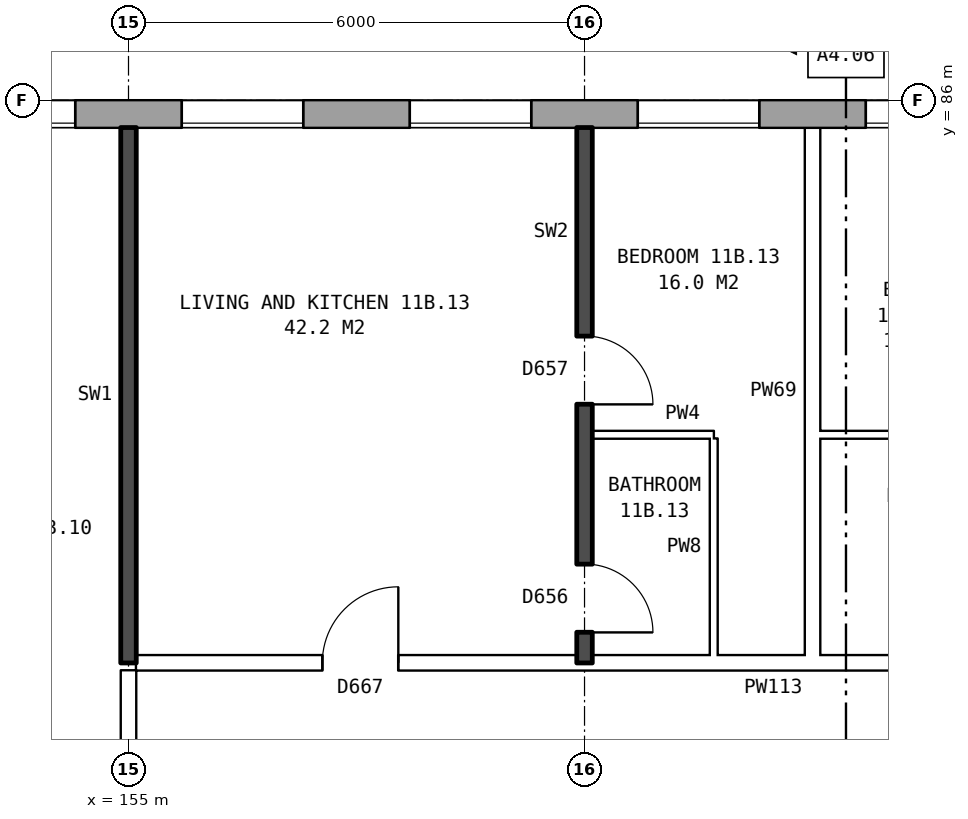
"""IFC4 building model, lengths in metres.
Left out: names, types, materials, properties, quantities, classifications, styles, units other than length and angle.
Written with IfcOpenShell. Run it as: python <this file> out.ifc"""

import sys

from ifc_helpers import new_model, si_unit, direction, frame, frame_2d, origin, place, context, subcontext, project, spatial, rectangle, extrude, element, fill, save


model = new_model("IFC4")
c1 = context("Model", 3, precision=1e-05, world=origin(), true_north=direction((0.0, 1.0)))
c2 = subcontext(c1, "Body", "Model", "MODEL_VIEW")
j1 = project(units=[si_unit("LENGTHUNIT", "METRE"), si_unit("PLANEANGLEUNIT", "RADIAN")], contexts=[c1])
p1 = place(None, origin())
s1 = spatial("IfcSite", under=j1, at=p1, CompositionType="ELEMENT")
p2 = place(p1, origin())
s2 = spatial("IfcBuilding", under=s1, at=p2, CompositionType="ELEMENT")
p3 = place(p2, frame((0.0, 0.0, 44.3)))
s3 = spatial("IfcBuildingStorey", under=s2, at=p3, CompositionType="ELEMENT", Elevation=44.3)
p4 = place(p3, frame((173.425, 85.82, 0.0), z_axis=(0.0, 0.0, 1.0), x_axis=(-1.0, 0.0, 0.0)))
e1 = element("IfcWall", 1, at=p4, inside=s3, PredefinedType="STANDARD", context=c2, shape_type="SweptSolid", body=[
    extrude(rectangle(XDim=39.351, YDim=0.36, at=frame_2d((19.675, 0.0))), origin(), (0.0, 0.0, 1.0), 2.85),
])
p5 = place(p4, frame((1.125, 0.0, 0.8)))
e2 = element("IfcOpeningElement", 2, at=p5, cuts=e1, PredefinedType="OPENING", context=c2, shape_type="SweptSolid", body=[
    extrude(rectangle(XDim=1.6, YDim=1.8, at=frame_2d((0.8, 0.9))), frame((0.0, 0.19, 0.0), z_axis=(0.0, -1.0, 0.0), x_axis=(1.0, 0.0, 0.0)), (0.0, 0.0, 1.0), 0.38),
])
p6 = place(p4, frame((4.125, 0.0, 0.8)))
e3 = element("IfcOpeningElement", 3, at=p6, cuts=e1, PredefinedType="OPENING", context=c2, shape_type="SweptSolid", body=[
    extrude(rectangle(XDim=1.6, YDim=1.8, at=frame_2d((0.8, 0.9))), frame((0.0, 0.19, 0.0), z_axis=(0.0, -1.0, 0.0), x_axis=(1.0, 0.0, 0.0)), (0.0, 0.0, 1.0), 0.38),
])
p7 = place(p4, frame((7.125, 0.0, 0.8)))
e4 = element("IfcOpeningElement", 4, at=p7, cuts=e1, PredefinedType="OPENING", context=c2, shape_type="SweptSolid", body=[
    extrude(rectangle(XDim=1.6, YDim=1.8, at=frame_2d((0.8, 0.9))), frame((0.0, 0.19, 0.0), z_axis=(0.0, -1.0, 0.0), x_axis=(1.0, 0.0, 0.0)), (0.0, 0.0, 1.0), 0.38),
])
p8 = place(p4, frame((10.125, 0.0, 0.8)))
e5 = element("IfcOpeningElement", 5, at=p8, cuts=e1, PredefinedType="OPENING", context=c2, shape_type="SweptSolid", body=[
    extrude(rectangle(XDim=1.6, YDim=1.8, at=frame_2d((0.8, 0.9))), frame((0.0, 0.19, 0.0), z_axis=(0.0, -1.0, 0.0), x_axis=(1.0, 0.0, 0.0)), (0.0, 0.0, 1.0), 0.38),
])
p9 = place(p4, frame((13.125, 0.0, 0.8)))
e6 = element("IfcOpeningElement", 6, at=p9, cuts=e1, PredefinedType="OPENING", context=c2, shape_type="SweptSolid", body=[
    extrude(rectangle(XDim=1.6, YDim=1.8, at=frame_2d((0.8, 0.9))), frame((0.0, 0.19, 0.0), z_axis=(0.0, -1.0, 0.0), x_axis=(1.0, 0.0, 0.0)), (0.0, 0.0, 1.0), 0.38),
])
p10 = place(p4, frame((16.125, 0.0, 0.8)))
e7 = element("IfcOpeningElement", 7, at=p10, cuts=e1, PredefinedType="OPENING", context=c2, shape_type="SweptSolid", body=[
    extrude(rectangle(XDim=1.6, YDim=1.8, at=frame_2d((0.8, 0.9))), frame((0.0, 0.19, 0.0), z_axis=(0.0, -1.0, 0.0), x_axis=(1.0, 0.0, 0.0)), (0.0, 0.0, 1.0), 0.38),
])
p11 = place(p4, frame((19.125, 0.0, 0.8)))
e8 = element("IfcOpeningElement", 8, at=p11, cuts=e1, PredefinedType="OPENING", context=c2, shape_type="SweptSolid", body=[
    extrude(rectangle(XDim=1.6, YDim=1.8, at=frame_2d((0.8, 0.9))), frame((0.0, 0.19, 0.0), z_axis=(0.0, -1.0, 0.0), x_axis=(1.0, 0.0, 0.0)), (0.0, 0.0, 1.0), 0.38),
])
p12 = place(p4, frame((22.125, 0.0, 0.8)))
e9 = element("IfcOpeningElement", 9, at=p12, cuts=e1, PredefinedType="OPENING", context=c2, shape_type="SweptSolid", body=[
    extrude(rectangle(XDim=1.6, YDim=1.8, at=frame_2d((0.8, 0.9))), frame((0.0, 0.19, 0.0), z_axis=(0.0, -1.0, 0.0), x_axis=(1.0, 0.0, 0.0)), (0.0, 0.0, 1.0), 0.38),
])
p13 = place(p4, frame((25.125, 0.0, 0.8)))
e10 = element("IfcOpeningElement", 10, at=p13, cuts=e1, PredefinedType="OPENING", context=c2, shape_type="SweptSolid", body=[
    extrude(rectangle(XDim=1.6, YDim=1.8, at=frame_2d((0.8, 0.9))), frame((0.0, 0.19, 0.0), z_axis=(0.0, -1.0, 0.0), x_axis=(1.0, 0.0, 0.0)), (0.0, 0.0, 1.0), 0.38),
])
p14 = place(p4, frame((28.125, 0.0, 0.8)))
e11 = element("IfcOpeningElement", 11, at=p14, cuts=e1, PredefinedType="OPENING", context=c2, shape_type="SweptSolid", body=[
    extrude(rectangle(XDim=1.6, YDim=1.8, at=frame_2d((0.8, 0.9))), frame((0.0, 0.19, 0.0), z_axis=(0.0, -1.0, 0.0), x_axis=(1.0, 0.0, 0.0)), (0.0, 0.0, 1.0), 0.38),
])
p15 = place(p4, frame((31.125, 0.0, 0.8)))
e12 = element("IfcOpeningElement", 12, at=p15, cuts=e1, PredefinedType="OPENING", context=c2, shape_type="SweptSolid", body=[
    extrude(rectangle(XDim=1.6, YDim=1.8, at=frame_2d((0.8, 0.9))), frame((0.0, 0.19, 0.0), z_axis=(0.0, -1.0, 0.0), x_axis=(1.0, 0.0, 0.0)), (0.0, 0.0, 1.0), 0.38),
])
p16 = place(p4, frame((34.125, 0.0, 0.8)))
e13 = element("IfcOpeningElement", 13, at=p16, cuts=e1, PredefinedType="OPENING", context=c2, shape_type="SweptSolid", body=[
    extrude(rectangle(XDim=1.6, YDim=1.8, at=frame_2d((0.8, 0.9))), frame((0.0, 0.19, 0.0), z_axis=(0.0, -1.0, 0.0), x_axis=(1.0, 0.0, 0.0)), (0.0, 0.0, 1.0), 0.38),
])
p17 = place(p4, frame((36.625, 0.0, 0.8)))
e14 = element("IfcOpeningElement", 14, at=p17, cuts=e1, PredefinedType="OPENING", context=c2, shape_type="SweptSolid", body=[
    extrude(rectangle(XDim=1.4, YDim=1.8, at=frame_2d((0.7, 0.9))), frame((0.0, 0.19, 0.0), z_axis=(0.0, -1.0, 0.0), x_axis=(1.0, 0.0, 0.0)), (0.0, 0.0, 1.0), 0.38),
])
p18 = place(p4, frame((38.325, 0.0, 0.8)))
e15 = element("IfcOpeningElement", 15, at=p18, cuts=e1, PredefinedType="OPENING", context=c2, shape_type="SweptSolid", body=[
    extrude(rectangle(XDim=0.6, YDim=0.9, at=frame_2d((0.3, 0.45))), frame((0.0, 0.19, 0.0), z_axis=(0.0, -1.0, 0.0), x_axis=(1.0, 0.0, 0.0)), (0.0, 0.0, 1.0), 0.38),
])
p19 = place(p3, frame((155.1, 78.6, 0.0), z_axis=(0.0, 0.0, 1.0), x_axis=(1.0, 0.0, 0.0)))
e16 = element("IfcWall", 16, at=p19, inside=s3, PredefinedType="PARTITIONING", context=c2, shape_type="SweptSolid", body=[
    extrude(rectangle(XDim=21.04, YDim=0.2, at=frame_2d((10.52, 0.0))), origin(), (0.0, 0.0, 1.0), 2.85),
])
p20 = place(p19, frame((2.45, 0.0, 0.0)))
e17 = element("IfcOpeningElement", 17, at=p20, cuts=e16, PredefinedType="OPENING", context=c2, shape_type="SweptSolid", body=[
    extrude(rectangle(XDim=1.0, YDim=2.1, at=frame_2d((0.5, 1.05))), frame((0.0, 0.11, 0.0), z_axis=(0.0, -1.0, 0.0), x_axis=(1.0, 0.0, 0.0)), (0.0, 0.0, 1.0), 0.22),
])
p21 = place(p19, frame((14.4, 0.0, 0.0)))
e18 = element("IfcOpeningElement", 18, at=p21, cuts=e16, PredefinedType="OPENING", context=c2, shape_type="SweptSolid", body=[
    extrude(rectangle(XDim=1.0, YDim=2.1, at=frame_2d((0.5, 1.05))), frame((0.0, 0.11, 0.0), z_axis=(0.0, -1.0, 0.0), x_axis=(1.0, 0.0, 0.0)), (0.0, 0.0, 1.0), 0.22),
])
p22 = place(p3, frame((161.1, 81.6, 0.0), z_axis=(0.0, 0.0, 1.0), x_axis=(1.0, 0.0, 0.0)))
e19 = element("IfcWall", 19, at=p22, inside=s3, PredefinedType="PARTITIONING", context=c2, shape_type="SweptSolid", body=[
    extrude(rectangle(XDim=1.6, YDim=0.1, at=frame_2d((0.8, 0.0))), origin(), (0.0, 0.0, 1.0), 2.85),
])
p23 = place(p3, frame((164.1, 81.6, 0.0), z_axis=(0.0, 0.0, 1.0), x_axis=(1.0, 0.0, 0.0)))
e20 = element("IfcWall", 20, at=p23, inside=s3, PredefinedType="PARTITIONING", context=c2, shape_type="SweptSolid", body=[
    extrude(rectangle(XDim=2.8, YDim=0.1, at=frame_2d((1.4, 0.0))), origin(), (0.0, 0.0, 1.0), 2.85),
])
p24 = place(p3, frame((155.0, 76.3, 0.0), z_axis=(0.0, 0.0, 1.0), x_axis=(0.0, 1.0, 0.0)))
e21 = element("IfcWall", 21, at=p24, inside=s3, PredefinedType="PARTITIONING", context=c2, shape_type="SweptSolid", body=[
    extrude(rectangle(XDim=2.2, YDim=0.2, at=frame_2d((1.1, 0.0))), origin(), (0.0, 0.0, 1.0), 2.85),
])
p25 = place(p3, frame((155.0, 78.6, 0.0), z_axis=(0.0, 0.0, 1.0), x_axis=(0.0, 1.0, 0.0)))
e22 = element("IfcWall", 22, at=p25, inside=s3, PredefinedType="SOLIDWALL", context=c2, shape_type="SweptSolid", body=[
    extrude(rectangle(XDim=7.04, YDim=0.2, at=frame_2d((3.52, 0.0))), origin(), (0.0, 0.0, 1.0), 2.85),
])
p26 = place(p3, frame((161.0, 78.6, 0.0), z_axis=(0.0, 0.0, 1.0), x_axis=(0.0, 1.0, 0.0)))
e23 = element("IfcWall", 23, at=p26, inside=s3, PredefinedType="SOLIDWALL", context=c2, shape_type="SweptSolid", body=[
    extrude(rectangle(XDim=7.04, YDim=0.2, at=frame_2d((3.52, 0.0))), origin(), (0.0, 0.0, 1.0), 2.85),
])
p27 = place(p26, frame((3.4, 0.0, 0.0)))
e24 = element("IfcOpeningElement", 24, at=p27, cuts=e23, PredefinedType="OPENING", context=c2, shape_type="SweptSolid", body=[
    extrude(rectangle(XDim=0.9, YDim=2.1, at=frame_2d((0.45, 1.05))), frame((0.0, 0.11, 0.0), z_axis=(0.0, -1.0, 0.0), x_axis=(1.0, 0.0, 0.0)), (0.0, 0.0, 1.0), 0.22),
])
p28 = place(p26, frame((0.4, 0.0, 0.0)))
e25 = element("IfcOpeningElement", 25, at=p28, cuts=e23, PredefinedType="OPENING", context=c2, shape_type="SweptSolid", body=[
    extrude(rectangle(XDim=0.9, YDim=2.1, at=frame_2d((0.45, 1.05))), frame((0.0, 0.11, 0.0), z_axis=(0.0, -1.0, 0.0), x_axis=(1.0, 0.0, 0.0)), (0.0, 0.0, 1.0), 0.22),
])
p29 = place(p3, frame((162.7, 78.7, 0.0), z_axis=(0.0, 0.0, 1.0), x_axis=(0.0, 1.0, 0.0)))
e26 = element("IfcWall", 26, at=p29, inside=s3, PredefinedType="PARTITIONING", context=c2, shape_type="SweptSolid", body=[
    extrude(rectangle(XDim=2.85, YDim=0.1, at=frame_2d((1.425, 0.0))), origin(), (0.0, 0.0, 1.0), 2.85),
])
p30 = place(p3, frame((164.0, 78.7, 0.0), z_axis=(0.0, 0.0, 1.0), x_axis=(0.0, 1.0, 0.0)))
e27 = element("IfcWall", 27, at=p30, inside=s3, PredefinedType="PARTITIONING", context=c2, shape_type="SweptSolid", body=[
    extrude(rectangle(XDim=6.94, YDim=0.2, at=frame_2d((3.47, 0.0))), origin(), (0.0, 0.0, 1.0), 2.85),
])
p31 = place(p7, origin())
e28 = element("IfcWindow", 28, at=p31, inside=s3, PartitioningType="SINGLE_PANEL", PredefinedType="WINDOW", context=c2, shape_type="SweptSolid", body=[
    extrude(rectangle(XDim=1.6, YDim=1.8, at=frame_2d((0.8, 0.9))), frame((0.0, 0.15, 0.0), z_axis=(0.0, -1.0, 0.0), x_axis=(1.0, 0.0, 0.0)), (0.0, 0.0, 1.0), 0.06),
])
fill(e4, e28)
p32 = place(p8, origin())
e29 = element("IfcWindow", 29, at=p32, inside=s3, PartitioningType="SINGLE_PANEL", PredefinedType="WINDOW", context=c2, shape_type="SweptSolid", body=[
    extrude(rectangle(XDim=1.6, YDim=1.8, at=frame_2d((0.8, 0.9))), frame((0.0, 0.15, 0.0), z_axis=(0.0, -1.0, 0.0), x_axis=(1.0, 0.0, 0.0)), (0.0, 0.0, 1.0), 0.06),
])
fill(e5, e29)
p33 = place(p9, origin())
e30 = element("IfcWindow", 30, at=p33, inside=s3, PartitioningType="SINGLE_PANEL", PredefinedType="WINDOW", context=c2, shape_type="SweptSolid", body=[
    extrude(rectangle(XDim=1.6, YDim=1.8, at=frame_2d((0.8, 0.9))), frame((0.0, 0.15, 0.0), z_axis=(0.0, -1.0, 0.0), x_axis=(1.0, 0.0, 0.0)), (0.0, 0.0, 1.0), 0.06),
])
fill(e6, e30)
p34 = place(p10, origin())
e31 = element("IfcWindow", 31, at=p34, inside=s3, PartitioningType="SINGLE_PANEL", PredefinedType="WINDOW", context=c2, shape_type="SweptSolid", body=[
    extrude(rectangle(XDim=1.6, YDim=1.8, at=frame_2d((0.8, 0.9))), frame((0.0, 0.15, 0.0), z_axis=(0.0, -1.0, 0.0), x_axis=(1.0, 0.0, 0.0)), (0.0, 0.0, 1.0), 0.06),
])
fill(e7, e31)
p35 = place(p11, origin())
e32 = element("IfcWindow", 32, at=p35, inside=s3, PartitioningType="SINGLE_PANEL", PredefinedType="WINDOW", context=c2, shape_type="SweptSolid", body=[
    extrude(rectangle(XDim=1.6, YDim=1.8, at=frame_2d((0.8, 0.9))), frame((0.0, 0.15, 0.0), z_axis=(0.0, -1.0, 0.0), x_axis=(1.0, 0.0, 0.0)), (0.0, 0.0, 1.0), 0.06),
])
fill(e8, e32)
p36 = place(p27, frame((0.9, 0.0, 0.0), z_axis=(0.0, 0.0, 1.0), x_axis=(-1.0, 0.0, 0.0)))
e33 = element("IfcDoor", 33, at=p36, inside=s3, OperationType="SINGLE_SWING_RIGHT", PredefinedType="DOOR", context=c2, shape_type="SweptSolid", body=[
    extrude(rectangle(XDim=0.9, YDim=2.1, at=frame_2d((0.45, 1.05))), frame((0.0, 0.025, 0.0), z_axis=(0.0, -1.0, 0.0), x_axis=(1.0, 0.0, 0.0)), (0.0, 0.0, 1.0), 0.05),
])
fill(e24, e33)
p37 = place(p20, origin())
e34 = element("IfcDoor", 34, at=p37, inside=s3, OperationType="SINGLE_SWING_RIGHT", PredefinedType="DOOR", context=c2, shape_type="SweptSolid", body=[
    extrude(rectangle(XDim=1.0, YDim=2.1, at=frame_2d((0.5, 1.05))), frame((0.0, 0.025, 0.0), z_axis=(0.0, -1.0, 0.0), x_axis=(1.0, 0.0, 0.0)), (0.0, 0.0, 1.0), 0.05),
])
fill(e17, e34)
p38 = place(p28, frame((0.9, 0.0, 0.0), z_axis=(0.0, 0.0, 1.0), x_axis=(-1.0, 0.0, 0.0)))
e35 = element("IfcDoor", 35, at=p38, inside=s3, OperationType="SINGLE_SWING_RIGHT", PredefinedType="DOOR", context=c2, shape_type="SweptSolid", body=[
    extrude(rectangle(XDim=0.9, YDim=2.1, at=frame_2d((0.45, 1.05))), frame((0.0, 0.025, 0.0), z_axis=(0.0, -1.0, 0.0), x_axis=(1.0, 0.0, 0.0)), (0.0, 0.0, 1.0), 0.05),
])
fill(e25, e35)
save(model, sys.argv[1])
